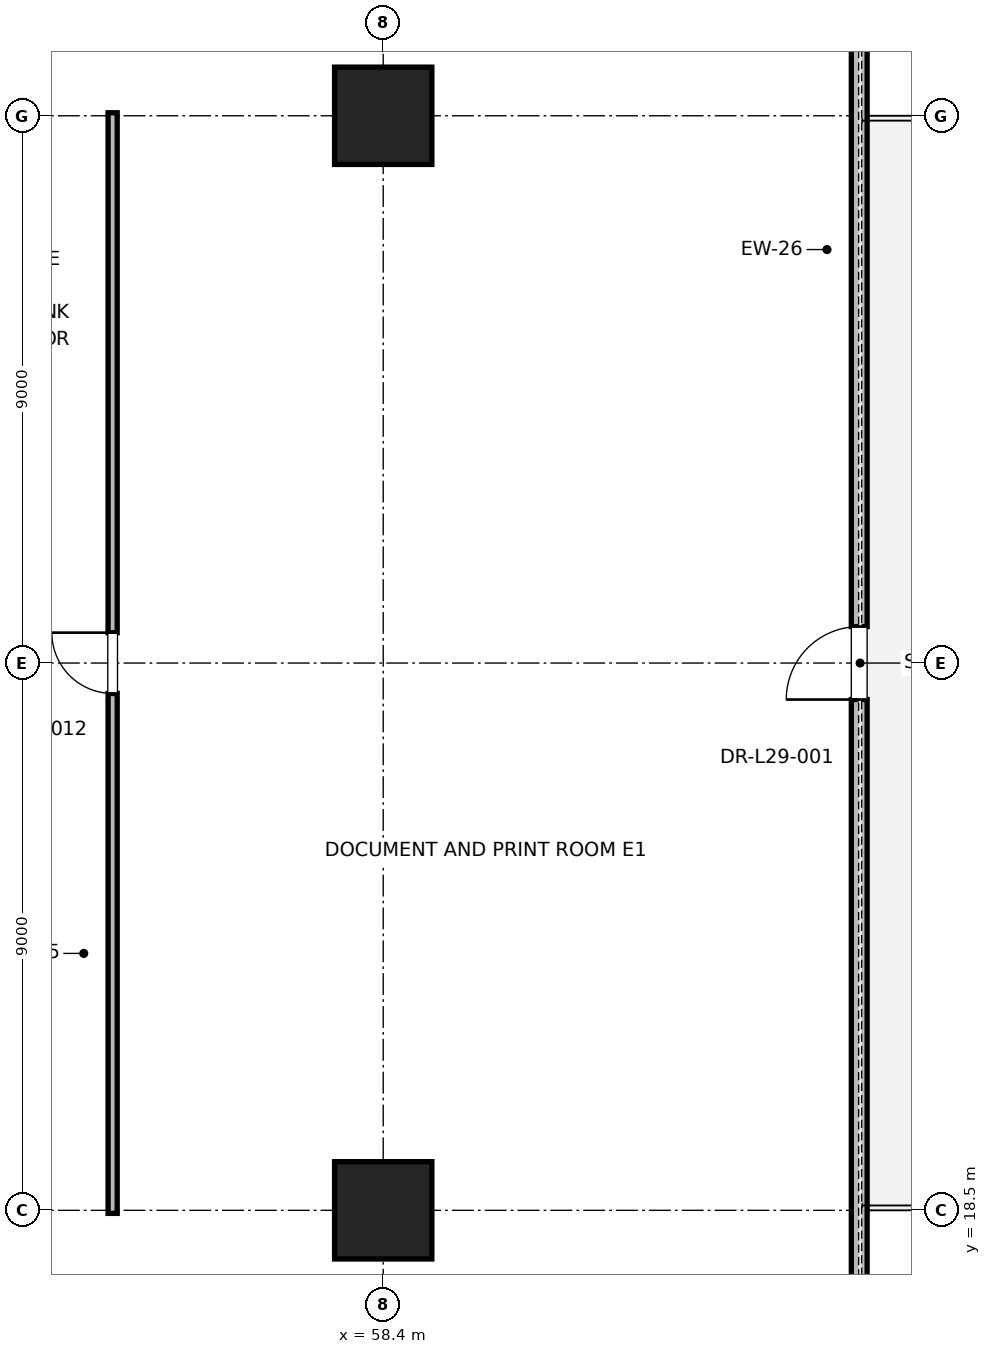
"""IFC4 building model, lengths in metres.
Left out: names, types, materials, properties, quantities, classifications, styles, units other than length and angle.
Written with IfcOpenShell. Run it as: python <this file> out.ifc"""

import sys

from ifc_helpers import new_model, si_unit, direction, frame, frame_2d, origin, origin_2d, place, context, subcontext, project, spatial, rectangle, extrude, element, fill, save


model = new_model("IFC4")
c1 = context("Model", 3, precision=1e-05, world=origin(), true_north=direction((0.0, 1.0)))
c2 = subcontext(c1, "Body", "Model", "MODEL_VIEW")
j1 = project(units=[si_unit("LENGTHUNIT", "METRE"), si_unit("PLANEANGLEUNIT", "RADIAN")], contexts=[c1])
p1 = place(None, origin())
s1 = spatial("IfcSite", under=j1, at=p1, CompositionType="ELEMENT")
p2 = place(p1, origin())
s2 = spatial("IfcBuilding", under=s1, at=p2, CompositionType="ELEMENT")
p3 = place(p2, frame((0.0, 0.0, 128.4)))
s3 = spatial("IfcBuildingStorey", under=s2, at=p3, CompositionType="ELEMENT", Elevation=128.4)
for number, where, z_axis, x_axis in (
    (1, (58.4, 18.5, 0.0), (0.0, 0.0, 1.0), (1.0, 0.0, 0.0)),
    (2, (58.4, 36.5, 0.0), (0.0, 0.0, 1.0), (1.0, 0.0, 0.0)),
):
    element("IfcColumn", number, at=place(p3, frame(where, z_axis=z_axis, x_axis=x_axis)), inside=s3, PredefinedType="COLUMN", context=c2, shape_type="SweptSolid", body=[
        extrude(rectangle(XDim=1.6, YDim=1.6, at=origin_2d()), origin(), (0.0, 0.0, 1.0), 4.0),
    ])
p4 = place(p3, frame((66.229, 8.3, 0.0), z_axis=(0.0, 0.0, 1.0), x_axis=(0.0, 1.0, 0.0)))
e3 = element("IfcWall", 3, at=p4, inside=s3, PredefinedType="PARAPET", context=c2, shape_type="SweptSolid", body=[
    extrude(rectangle(XDim=38.4, YDim=0.26, at=frame_2d((19.2, 0.0))), origin(), (0.0, 0.0, 1.0), 2.97),
])
p5 = place(p4, frame((4.2, 0.0, 0.85)))
e4 = element("IfcOpeningElement", 4, at=p5, cuts=e3, PredefinedType="OPENING", context=c2, shape_type="SweptSolid", body=[
    extrude(rectangle(XDim=2.0, YDim=2.3, at=frame_2d((1.0, 1.15))), frame((0.0, 0.13, 0.0), z_axis=(0.0, -1.0, 0.0), x_axis=(1.0, 0.0, 0.0)), (0.0, 0.0, 1.0), 0.26),
])
p6 = place(p4, frame((18.6, 0.0, 0.0)))
e5 = element("IfcOpeningElement", 5, at=p6, cuts=e3, PredefinedType="OPENING", context=c2, shape_type="SweptSolid", body=[
    extrude(rectangle(XDim=1.2, YDim=2.2, at=frame_2d((0.6, 1.1))), frame((0.0, 0.13, 0.0), z_axis=(0.0, -1.0, 0.0), x_axis=(1.0, 0.0, 0.0)), (0.0, 0.0, 1.0), 0.26),
])
p7 = place(p4, frame((32.2, 0.0, 0.85)))
e6 = element("IfcOpeningElement", 6, at=p7, cuts=e3, PredefinedType="OPENING", context=c2, shape_type="SweptSolid", body=[
    extrude(rectangle(XDim=2.0, YDim=2.3, at=frame_2d((1.0, 1.15))), frame((0.0, 0.13, 0.0), z_axis=(0.0, -1.0, 0.0), x_axis=(1.0, 0.0, 0.0)), (0.0, 0.0, 1.0), 0.26),
])
p8 = place(p3, frame((53.95, 18.45, 0.0), z_axis=(0.0, 0.0, 1.0), x_axis=(0.0, 1.0, 0.0)))
e7 = element("IfcWall", 7, at=p8, inside=s3, PredefinedType="PARTITIONING", context=c2, shape_type="SweptSolid", body=[
    extrude(rectangle(XDim=18.1, YDim=0.15, at=frame_2d((9.05, 0.0))), origin(), (0.0, 0.0, 1.0), 2.85),
])
p9 = place(p8, frame((8.55, 0.0, 0.0)))
e8 = element("IfcOpeningElement", 8, at=p9, cuts=e7, PredefinedType="OPENING", context=c2, shape_type="SweptSolid", body=[
    extrude(rectangle(XDim=1.0, YDim=2.15, at=frame_2d((0.5, 1.075))), frame((0.0, 0.075, 0.0), z_axis=(0.0, -1.0, 0.0), x_axis=(1.0, 0.0, 0.0)), (0.0, 0.0, 1.0), 0.15),
])
p10 = place(p6, origin())
e9 = element("IfcDoor", 9, at=p10, inside=s3, OperationType="SINGLE_SWING_LEFT", PredefinedType="DOOR", context=c2, shape_type="SweptSolid", body=[
    extrude(rectangle(XDim=1.2, YDim=2.2, at=frame_2d((0.6, 1.1))), frame((0.0, 0.025, 0.0), z_axis=(0.0, -1.0, 0.0), x_axis=(1.0, 0.0, 0.0)), (0.0, 0.0, 1.0), 0.05),
])
fill(e5, e9)
p11 = place(p9, origin())
e10 = element("IfcDoor", 10, at=p11, inside=s3, OperationType="SINGLE_SWING_RIGHT", PredefinedType="DOOR", context=c2, shape_type="SweptSolid", body=[
    extrude(rectangle(XDim=1.0, YDim=2.15, at=frame_2d((0.5, 1.075))), frame((0.0, 0.025, 0.0), z_axis=(0.0, -1.0, 0.0), x_axis=(1.0, 0.0, 0.0)), (0.0, 0.0, 1.0), 0.05),
])
fill(e8, e10)
save(model, sys.argv[1])
